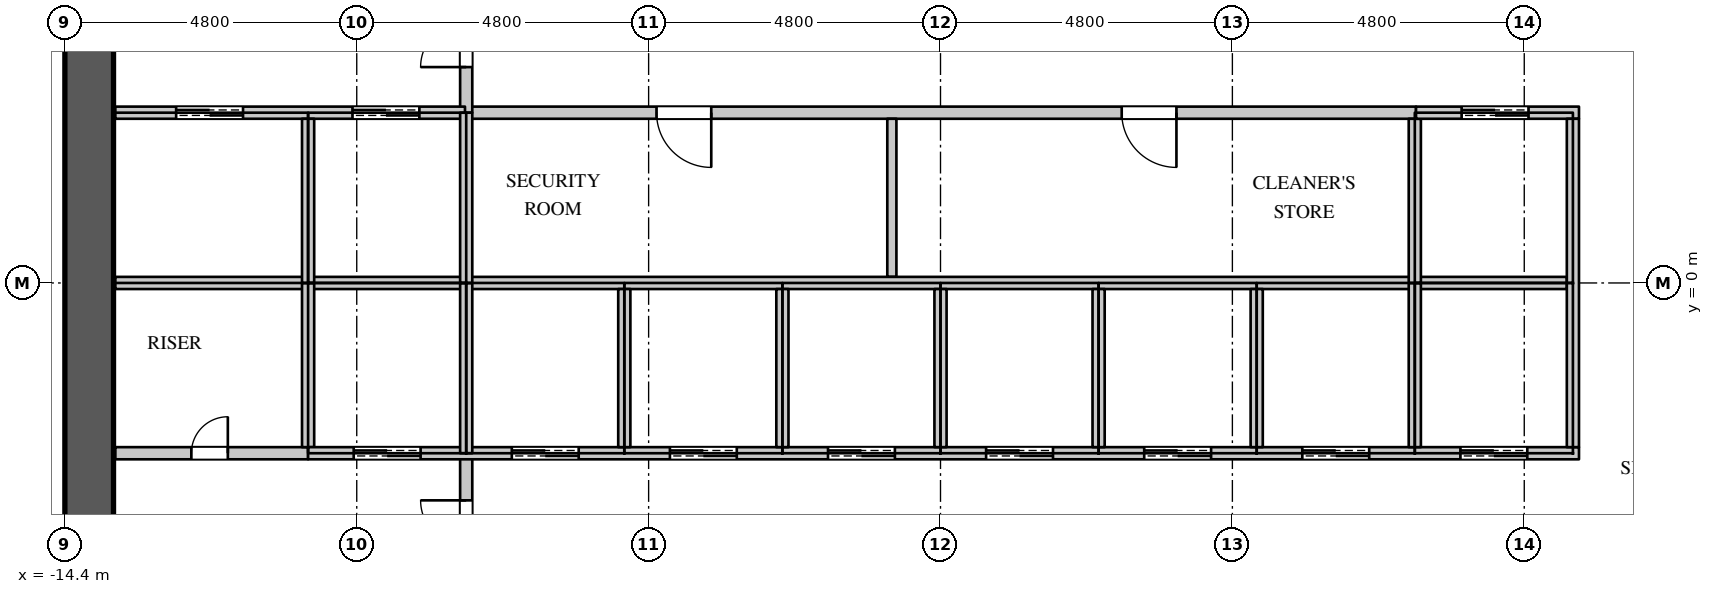
"""IFC4 building model, lengths in metres.
Left out: names, types, materials, properties, quantities, classifications, styles, units other than length and angle.
Written with IfcOpenShell. Run it as: python <this file> out.ifc"""

import sys

from ifc_helpers import new_model, si_unit, direction, frame, frame_2d, origin, place, context, subcontext, project, spatial, rectangle, extrude, element, fill, save


model = new_model("IFC4")
c1 = context("Model", 3, precision=1e-05, world=origin(), true_north=direction((0.0, 1.0)))
c2 = subcontext(c1, "Body", "Model", "MODEL_VIEW")
j1 = project(units=[si_unit("LENGTHUNIT", "METRE"), si_unit("PLANEANGLEUNIT", "RADIAN")], contexts=[c1])
p1 = place(None, origin())
s1 = spatial("IfcSite", under=j1, at=p1, CompositionType="ELEMENT")
p2 = place(p1, origin())
s2 = spatial("IfcBuilding", under=s1, at=p2, CompositionType="ELEMENT")
p3 = place(p2, frame((0.0, 0.0, 156.9)))
s3 = spatial("IfcBuildingStorey", under=s2, at=p3, CompositionType="ELEMENT", Elevation=156.9)
p4 = place(p3, frame((-14.0, -11.2, 0.0), z_axis=(0.0, 0.0, 1.0), x_axis=(0.0, 1.0, 0.0)))
e1 = element("IfcWall", 1, at=p4, inside=s3, PredefinedType="SHEAR", context=c2, shape_type="SweptSolid", body=[
    extrude(rectangle(XDim=22.4, YDim=0.8, at=frame_2d((11.2, 0.0))), origin(), (0.0, 0.0, 1.0), 5.4),
])
p5 = place(p4, frame((15.9, 0.0, 0.0)))
e2 = element("IfcOpeningElement", 2, at=p5, cuts=e1, PredefinedType="OPENING", context=c2, shape_type="SweptSolid", body=[
    extrude(rectangle(XDim=1.5, YDim=2.4, at=frame_2d((0.75, 1.2))), frame((0.0, 0.41, 0.0), z_axis=(0.0, -1.0, 0.0), x_axis=(1.0, 0.0, 0.0)), (0.0, 0.0, 1.0), 0.82),
])
p6 = place(p4, frame((4.9, 0.0, 0.0)))
e3 = element("IfcOpeningElement", 3, at=p6, cuts=e1, PredefinedType="OPENING", context=c2, shape_type="SweptSolid", body=[
    extrude(rectangle(XDim=1.5, YDim=2.4, at=frame_2d((0.75, 1.2))), frame((0.0, 0.41, 0.0), z_axis=(0.0, -1.0, 0.0), x_axis=(1.0, 0.0, 0.0)), (0.0, 0.0, 1.0), 0.82),
])
p7 = place(p3, frame((-7.82, 2.8, 0.0), z_axis=(0.0, 0.0, 1.0), x_axis=(1.0, 0.0, 0.0)))
e4 = element("IfcWall", 4, at=p7, inside=s3, PredefinedType="PARTITIONING", context=c2, shape_type="SweptSolid", body=[
    extrude(rectangle(XDim=15.64, YDim=0.2, at=frame_2d((7.82, 0.0))), origin(), (0.0, 0.0, 1.0), 5.1),
])
p8 = place(p7, frame((3.15, 0.0, 0.0)))
e5 = element("IfcOpeningElement", 5, at=p8, cuts=e4, PredefinedType="OPENING", context=c2, shape_type="SweptSolid", body=[
    extrude(rectangle(XDim=0.9, YDim=2.2, at=frame_2d((0.45, 1.1))), frame((0.0, 0.11, 0.0), z_axis=(0.0, -1.0, 0.0), x_axis=(1.0, 0.0, 0.0)), (0.0, 0.0, 1.0), 0.22),
])
p9 = place(p7, frame((10.8, 0.0, 0.0)))
e6 = element("IfcOpeningElement", 6, at=p9, cuts=e4, PredefinedType="OPENING", context=c2, shape_type="SweptSolid", body=[
    extrude(rectangle(XDim=0.9, YDim=2.2, at=frame_2d((0.45, 1.1))), frame((0.0, 0.11, 0.0), z_axis=(0.0, -1.0, 0.0), x_axis=(1.0, 0.0, 0.0)), (0.0, 0.0, 1.0), 0.22),
])
p10 = place(p3, frame((-7.8, -8.075, 0.0), z_axis=(0.0, 0.0, 1.0), x_axis=(0.0, 1.0, 0.0)))
e7 = element("IfcWall", 7, at=p10, inside=s3, PredefinedType="PARTITIONING", context=c2, shape_type="SweptSolid", body=[
    extrude(rectangle(XDim=5.275, YDim=0.2, at=frame_2d((2.637, 0.0))), origin(), (0.0, 0.0, 1.0), 5.1),
])
p11 = place(p10, frame((3.0, 0.0, 0.0)))
e8 = element("IfcOpeningElement", 8, at=p11, cuts=e7, PredefinedType="OPENING", context=c2, shape_type="SweptSolid", body=[
    extrude(rectangle(XDim=1.5, YDim=2.4, at=frame_2d((0.75, 1.2))), frame((0.0, 0.11, 0.0), z_axis=(0.0, -1.0, 0.0), x_axis=(1.0, 0.0, 0.0)), (0.0, 0.0, 1.0), 0.22),
])
p12 = place(p3, frame((-7.8, 2.8, 0.0), z_axis=(0.0, 0.0, 1.0), x_axis=(0.0, 1.0, 0.0)))
e9 = element("IfcWall", 9, at=p12, inside=s3, PredefinedType="PARTITIONING", context=c2, shape_type="SweptSolid", body=[
    extrude(rectangle(XDim=3.0, YDim=0.2, at=frame_2d((1.5, 0.0))), origin(), (0.0, 0.0, 1.0), 5.1),
])
p13 = place(p12, frame((0.75, 0.0, 0.0)))
e10 = element("IfcOpeningElement", 10, at=p13, cuts=e9, PredefinedType="OPENING", context=c2, shape_type="SweptSolid", body=[
    extrude(rectangle(XDim=1.5, YDim=2.4, at=frame_2d((0.75, 1.2))), frame((0.0, 0.11, 0.0), z_axis=(0.0, -1.0, 0.0), x_axis=(1.0, 0.0, 0.0)), (0.0, 0.0, 1.0), 0.22),
])
p14 = place(p3, frame((-0.8, 0.1, 0.0), z_axis=(0.0, 0.0, 1.0), x_axis=(0.0, 1.0, 0.0)))
e11 = element("IfcWall", 11, at=p14, inside=s3, PredefinedType="PARTITIONING", context=c2, shape_type="SweptSolid", body=[
    extrude(rectangle(XDim=2.6, YDim=0.15, at=frame_2d((1.3, 0.0))), origin(), (0.0, 0.0, 1.0), 5.1),
])
p15 = place(p3, frame((-13.57, -2.8, 0.0), z_axis=(0.0, 0.0, 1.0), x_axis=(1.0, 0.0, 0.0)))
e12 = element("IfcWall", 12, at=p15, inside=s3, PredefinedType="PARTITIONING", context=c2, shape_type="SweptSolid", body=[
    extrude(rectangle(XDim=3.17, YDim=0.2, at=frame_2d((1.585, 0.0))), origin(), (0.0, 0.0, 1.0), 5.1),
])
p16 = place(p15, frame((1.25, 0.0, 0.0)))
e13 = element("IfcOpeningElement", 13, at=p16, cuts=e12, PredefinedType="OPENING", context=c2, shape_type="SweptSolid", body=[
    extrude(rectangle(XDim=0.6, YDim=2.0, at=frame_2d((0.3, 1.0))), frame((0.0, 0.11, 0.0), z_axis=(0.0, -1.0, 0.0), x_axis=(1.0, 0.0, 0.0)), (0.0, 0.0, 1.0), 0.22),
])
p17 = place(p3, frame((-13.57, 0.0, 0.0), z_axis=(0.0, 0.0, 1.0), x_axis=(1.0, 0.0, 0.0)))
e14 = element("IfcWall", 14, at=p17, inside=s3, PredefinedType="PARTITIONING", context=c2, shape_type="SweptSolid", body=[
    extrude(rectangle(XDim=23.87, YDim=0.2, at=frame_2d((11.935, 0.0))), origin(), (0.0, 0.0, 1.0), 5.1),
])
p18 = place(p3, frame((-13.57, 2.8, 0.0), z_axis=(0.0, 0.0, 1.0), x_axis=(1.0, 0.0, 0.0)))
e15 = element("IfcWall", 15, at=p18, inside=s3, PredefinedType="PARTITIONING", context=c2, shape_type="SweptSolid", body=[
    extrude(rectangle(XDim=5.75, YDim=0.2, at=frame_2d((2.875, 0.0))), origin(), (0.0, 0.0, 1.0), 5.1),
])
p19 = place(p18, frame((1.0, 0.0, 0.0)))
e16 = element("IfcOpeningElement", 16, at=p19, cuts=e15, PredefinedType="OPENING", context=c2, shape_type="SweptSolid", body=[
    extrude(rectangle(XDim=1.1, YDim=2.2, at=frame_2d((0.55, 1.1))), frame((0.0, 0.11, 0.0), z_axis=(0.0, -1.0, 0.0), x_axis=(1.0, 0.0, 0.0)), (0.0, 0.0, 1.0), 0.22),
])
p20 = place(p18, frame((3.9, 0.0, 0.0)))
e17 = element("IfcOpeningElement", 17, at=p20, cuts=e15, PredefinedType="OPENING", context=c2, shape_type="SweptSolid", body=[
    extrude(rectangle(XDim=1.1, YDim=2.2, at=frame_2d((0.55, 1.1))), frame((0.0, 0.11, 0.0), z_axis=(0.0, -1.0, 0.0), x_axis=(1.0, 0.0, 0.0)), (0.0, 0.0, 1.0), 0.22),
])
p21 = place(p3, frame((-10.4, -2.7, 0.0), z_axis=(0.0, 0.0, 1.0), x_axis=(0.0, 1.0, 0.0)))
e18 = element("IfcWall", 18, at=p21, inside=s3, PredefinedType="PARTITIONING", context=c2, shape_type="SweptSolid", body=[
    extrude(rectangle(XDim=2.7, YDim=0.2, at=frame_2d((1.35, 0.0))), origin(), (0.0, 0.0, 1.0), 5.1),
])
p22 = place(p3, frame((-10.4, -2.8, 0.0), z_axis=(0.0, 0.0, 1.0), x_axis=(1.0, 0.0, 0.0)))
e19 = element("IfcWall", 19, at=p22, inside=s3, PredefinedType="PARTITIONING", context=c2, shape_type="SweptSolid", body=[
    extrude(rectangle(XDim=20.9, YDim=0.2, at=frame_2d((10.45, 0.0))), origin(), (0.0, 0.0, 1.0), 5.1),
])
p23 = place(p22, frame((0.75, 0.0, 0.0)))
e20 = element("IfcOpeningElement", 20, at=p23, cuts=e19, PredefinedType="OPENING", context=c2, shape_type="SweptSolid", body=[
    extrude(rectangle(XDim=1.1, YDim=2.2, at=frame_2d((0.55, 1.1))), frame((0.0, 0.11, 0.0), z_axis=(0.0, -1.0, 0.0), x_axis=(1.0, 0.0, 0.0)), (0.0, 0.0, 1.0), 0.22),
])
p24 = place(p22, frame((3.35, 0.0, 0.0)))
e21 = element("IfcOpeningElement", 21, at=p24, cuts=e19, PredefinedType="OPENING", context=c2, shape_type="SweptSolid", body=[
    extrude(rectangle(XDim=1.1, YDim=2.2, at=frame_2d((0.55, 1.1))), frame((0.0, 0.11, 0.0), z_axis=(0.0, -1.0, 0.0), x_axis=(1.0, 0.0, 0.0)), (0.0, 0.0, 1.0), 0.22),
])
p25 = place(p22, frame((5.95, 0.0, 0.0)))
e22 = element("IfcOpeningElement", 22, at=p25, cuts=e19, PredefinedType="OPENING", context=c2, shape_type="SweptSolid", body=[
    extrude(rectangle(XDim=1.1, YDim=2.2, at=frame_2d((0.55, 1.1))), frame((0.0, 0.11, 0.0), z_axis=(0.0, -1.0, 0.0), x_axis=(1.0, 0.0, 0.0)), (0.0, 0.0, 1.0), 0.22),
])
p26 = place(p22, frame((8.55, 0.0, 0.0)))
e23 = element("IfcOpeningElement", 23, at=p26, cuts=e19, PredefinedType="OPENING", context=c2, shape_type="SweptSolid", body=[
    extrude(rectangle(XDim=1.1, YDim=2.2, at=frame_2d((0.55, 1.1))), frame((0.0, 0.11, 0.0), z_axis=(0.0, -1.0, 0.0), x_axis=(1.0, 0.0, 0.0)), (0.0, 0.0, 1.0), 0.22),
])
p27 = place(p22, frame((11.15, 0.0, 0.0)))
e24 = element("IfcOpeningElement", 24, at=p27, cuts=e19, PredefinedType="OPENING", context=c2, shape_type="SweptSolid", body=[
    extrude(rectangle(XDim=1.1, YDim=2.2, at=frame_2d((0.55, 1.1))), frame((0.0, 0.11, 0.0), z_axis=(0.0, -1.0, 0.0), x_axis=(1.0, 0.0, 0.0)), (0.0, 0.0, 1.0), 0.22),
])
p28 = place(p22, frame((13.75, 0.0, 0.0)))
e25 = element("IfcOpeningElement", 25, at=p28, cuts=e19, PredefinedType="OPENING", context=c2, shape_type="SweptSolid", body=[
    extrude(rectangle(XDim=1.1, YDim=2.2, at=frame_2d((0.55, 1.1))), frame((0.0, 0.11, 0.0), z_axis=(0.0, -1.0, 0.0), x_axis=(1.0, 0.0, 0.0)), (0.0, 0.0, 1.0), 0.22),
])
p29 = place(p22, frame((16.35, 0.0, 0.0)))
e26 = element("IfcOpeningElement", 26, at=p29, cuts=e19, PredefinedType="OPENING", context=c2, shape_type="SweptSolid", body=[
    extrude(rectangle(XDim=1.1, YDim=2.2, at=frame_2d((0.55, 1.1))), frame((0.0, 0.11, 0.0), z_axis=(0.0, -1.0, 0.0), x_axis=(1.0, 0.0, 0.0)), (0.0, 0.0, 1.0), 0.22),
])
p30 = place(p22, frame((18.95, 0.0, 0.0)))
e27 = element("IfcOpeningElement", 27, at=p30, cuts=e19, PredefinedType="OPENING", context=c2, shape_type="SweptSolid", body=[
    extrude(rectangle(XDim=1.1, YDim=2.2, at=frame_2d((0.55, 1.1))), frame((0.0, 0.11, 0.0), z_axis=(0.0, -1.0, 0.0), x_axis=(1.0, 0.0, 0.0)), (0.0, 0.0, 1.0), 0.22),
])
p31 = place(p3, frame((-10.4, 0.0, 0.0), z_axis=(0.0, 0.0, 1.0), x_axis=(0.0, 1.0, 0.0)))
e28 = element("IfcWall", 28, at=p31, inside=s3, PredefinedType="PARTITIONING", context=c2, shape_type="SweptSolid", body=[
    extrude(rectangle(XDim=2.7, YDim=0.2, at=frame_2d((1.35, 0.0))), origin(), (0.0, 0.0, 1.0), 5.1),
])
for number, where, z_axis, x_axis in (
    (29, (-7.8, -2.8, 0.0), (0.0, 0.0, 1.0), (0.0, 1.0, 0.0)),
    (30, (-7.8, 0.0, 0.0), (0.0, 0.0, 1.0), (0.0, 1.0, 0.0)),
):
    element("IfcWall", number, at=place(p3, frame(where, z_axis=z_axis, x_axis=x_axis)), inside=s3, PredefinedType="PARTITIONING", context=c2, shape_type="SweptSolid", body=[
        extrude(rectangle(XDim=2.8, YDim=0.2, at=frame_2d((1.4, 0.0))), origin(), (0.0, 0.0, 1.0), 5.1),
    ])
for number, where, z_axis, x_axis in (
    (31, (-5.2, -2.7, 0.0), (0.0, 0.0, 1.0), (0.0, 1.0, 0.0)),
    (32, (-2.6, -2.7, 0.0), (0.0, 0.0, 1.0), (0.0, 1.0, 0.0)),
    (33, (0.0, -2.7, 0.0), (0.0, 0.0, 1.0), (0.0, 1.0, 0.0)),
    (34, (2.6, -2.7, 0.0), (0.0, 0.0, 1.0), (0.0, 1.0, 0.0)),
    (35, (5.2, -2.7, 0.0), (0.0, 0.0, 1.0), (0.0, 1.0, 0.0)),
):
    element("IfcWall", number, at=place(p3, frame(where, z_axis=z_axis, x_axis=x_axis)), inside=s3, PredefinedType="PARTITIONING", context=c2, shape_type="SweptSolid", body=[
        extrude(rectangle(XDim=2.6, YDim=0.2, at=frame_2d((1.3, 0.0))), origin(), (0.0, 0.0, 1.0), 5.1),
    ])
for number, where, z_axis, x_axis in (
    (36, (7.8, -2.7, 0.0), (0.0, 0.0, 1.0), (0.0, 1.0, 0.0)),
    (37, (7.8, 0.0, 0.0), (0.0, 0.0, 1.0), (0.0, 1.0, 0.0)),
):
    element("IfcWall", number, at=place(p3, frame(where, z_axis=z_axis, x_axis=x_axis)), inside=s3, PredefinedType="PARTITIONING", context=c2, shape_type="SweptSolid", body=[
        extrude(rectangle(XDim=2.7, YDim=0.2, at=frame_2d((1.35, 0.0))), origin(), (0.0, 0.0, 1.0), 5.1),
    ])
p32 = place(p3, frame((7.82, 2.8, 0.0), z_axis=(0.0, 0.0, 1.0), x_axis=(1.0, 0.0, 0.0)))
e38 = element("IfcWall", 38, at=p32, inside=s3, PredefinedType="PARTITIONING", context=c2, shape_type="SweptSolid", body=[
    extrude(rectangle(XDim=2.68, YDim=0.2, at=frame_2d((1.34, 0.0))), origin(), (0.0, 0.0, 1.0), 5.1),
])
p33 = place(p32, frame((0.75, 0.0, 0.0)))
e39 = element("IfcOpeningElement", 39, at=p33, cuts=e38, PredefinedType="OPENING", context=c2, shape_type="SweptSolid", body=[
    extrude(rectangle(XDim=1.1, YDim=2.2, at=frame_2d((0.55, 1.1))), frame((0.0, 0.11, 0.0), z_axis=(0.0, -1.0, 0.0), x_axis=(1.0, 0.0, 0.0)), (0.0, 0.0, 1.0), 0.22),
])
p34 = place(p3, frame((10.4, -2.7, 0.0), z_axis=(0.0, 0.0, 1.0), x_axis=(0.0, 1.0, 0.0)))
e40 = element("IfcWall", 40, at=p34, inside=s3, PredefinedType="PARTITIONING", context=c2, shape_type="SweptSolid", body=[
    extrude(rectangle(XDim=5.4, YDim=0.2, at=frame_2d((2.7, 0.0))), origin(), (0.0, 0.0, 1.0), 5.1),
])
p35 = place(p16, origin())
e41 = element("IfcDoor", 41, at=p35, inside=s3, OperationType="SINGLE_SWING_RIGHT", PredefinedType="DOOR", context=c2, shape_type="SweptSolid", body=[
    extrude(rectangle(XDim=0.6, YDim=2.0, at=frame_2d((0.3, 1.0))), frame((0.0, 0.025, 0.0), z_axis=(0.0, -1.0, 0.0), x_axis=(1.0, 0.0, 0.0)), (0.0, 0.0, 1.0), 0.05),
])
fill(e13, e41)
p36 = place(p8, origin())
e42 = element("IfcDoor", 42, at=p36, inside=s3, OperationType="SINGLE_SWING_LEFT", PredefinedType="DOOR", context=c2, shape_type="SweptSolid", body=[
    extrude(rectangle(XDim=0.9, YDim=2.2, at=frame_2d((0.45, 1.1))), frame((0.0, 0.025, 0.0), z_axis=(0.0, -1.0, 0.0), x_axis=(1.0, 0.0, 0.0)), (0.0, 0.0, 1.0), 0.05),
])
fill(e5, e42)
p37 = place(p9, origin())
e43 = element("IfcDoor", 43, at=p37, inside=s3, OperationType="SINGLE_SWING_LEFT", PredefinedType="DOOR", context=c2, shape_type="SweptSolid", body=[
    extrude(rectangle(XDim=0.9, YDim=2.2, at=frame_2d((0.45, 1.1))), frame((0.0, 0.025, 0.0), z_axis=(0.0, -1.0, 0.0), x_axis=(1.0, 0.0, 0.0)), (0.0, 0.0, 1.0), 0.05),
])
fill(e6, e43)
p38 = place(p19, origin())
e44 = element("IfcDoor", 44, at=p38, inside=s3, OperationType="DOUBLE_DOOR_SLIDING", PredefinedType="DOOR", context=c2, shape_type="SweptSolid", body=[
    extrude(rectangle(XDim=1.1, YDim=2.2, at=frame_2d((0.55, 1.1))), frame((0.0, 0.025, 0.0), z_axis=(0.0, -1.0, 0.0), x_axis=(1.0, 0.0, 0.0)), (0.0, 0.0, 1.0), 0.05),
])
fill(e16, e44)
p39 = place(p20, origin())
e45 = element("IfcDoor", 45, at=p39, inside=s3, OperationType="DOUBLE_DOOR_SLIDING", PredefinedType="DOOR", context=c2, shape_type="SweptSolid", body=[
    extrude(rectangle(XDim=1.1, YDim=2.2, at=frame_2d((0.55, 1.1))), frame((0.0, 0.025, 0.0), z_axis=(0.0, -1.0, 0.0), x_axis=(1.0, 0.0, 0.0)), (0.0, 0.0, 1.0), 0.05),
])
fill(e17, e45)
p40 = place(p23, origin())
e46 = element("IfcDoor", 46, at=p40, inside=s3, OperationType="DOUBLE_DOOR_SLIDING", PredefinedType="DOOR", context=c2, shape_type="SweptSolid", body=[
    extrude(rectangle(XDim=1.1, YDim=2.2, at=frame_2d((0.55, 1.1))), frame((0.0, 0.025, 0.0), z_axis=(0.0, -1.0, 0.0), x_axis=(1.0, 0.0, 0.0)), (0.0, 0.0, 1.0), 0.05),
])
fill(e20, e46)
p41 = place(p24, origin())
e47 = element("IfcDoor", 47, at=p41, inside=s3, OperationType="DOUBLE_DOOR_SLIDING", PredefinedType="DOOR", context=c2, shape_type="SweptSolid", body=[
    extrude(rectangle(XDim=1.1, YDim=2.2, at=frame_2d((0.55, 1.1))), frame((0.0, 0.025, 0.0), z_axis=(0.0, -1.0, 0.0), x_axis=(1.0, 0.0, 0.0)), (0.0, 0.0, 1.0), 0.05),
])
fill(e21, e47)
p42 = place(p25, origin())
e48 = element("IfcDoor", 48, at=p42, inside=s3, OperationType="DOUBLE_DOOR_SLIDING", PredefinedType="DOOR", context=c2, shape_type="SweptSolid", body=[
    extrude(rectangle(XDim=1.1, YDim=2.2, at=frame_2d((0.55, 1.1))), frame((0.0, 0.025, 0.0), z_axis=(0.0, -1.0, 0.0), x_axis=(1.0, 0.0, 0.0)), (0.0, 0.0, 1.0), 0.05),
])
fill(e22, e48)
p43 = place(p26, origin())
e49 = element("IfcDoor", 49, at=p43, inside=s3, OperationType="DOUBLE_DOOR_SLIDING", PredefinedType="DOOR", context=c2, shape_type="SweptSolid", body=[
    extrude(rectangle(XDim=1.1, YDim=2.2, at=frame_2d((0.55, 1.1))), frame((0.0, 0.025, 0.0), z_axis=(0.0, -1.0, 0.0), x_axis=(1.0, 0.0, 0.0)), (0.0, 0.0, 1.0), 0.05),
])
fill(e23, e49)
p44 = place(p27, origin())
e50 = element("IfcDoor", 50, at=p44, inside=s3, OperationType="DOUBLE_DOOR_SLIDING", PredefinedType="DOOR", context=c2, shape_type="SweptSolid", body=[
    extrude(rectangle(XDim=1.1, YDim=2.2, at=frame_2d((0.55, 1.1))), frame((0.0, 0.025, 0.0), z_axis=(0.0, -1.0, 0.0), x_axis=(1.0, 0.0, 0.0)), (0.0, 0.0, 1.0), 0.05),
])
fill(e24, e50)
p45 = place(p28, origin())
e51 = element("IfcDoor", 51, at=p45, inside=s3, OperationType="DOUBLE_DOOR_SLIDING", PredefinedType="DOOR", context=c2, shape_type="SweptSolid", body=[
    extrude(rectangle(XDim=1.1, YDim=2.2, at=frame_2d((0.55, 1.1))), frame((0.0, 0.025, 0.0), z_axis=(0.0, -1.0, 0.0), x_axis=(1.0, 0.0, 0.0)), (0.0, 0.0, 1.0), 0.05),
])
fill(e25, e51)
p46 = place(p29, origin())
e52 = element("IfcDoor", 52, at=p46, inside=s3, OperationType="DOUBLE_DOOR_SLIDING", PredefinedType="DOOR", context=c2, shape_type="SweptSolid", body=[
    extrude(rectangle(XDim=1.1, YDim=2.2, at=frame_2d((0.55, 1.1))), frame((0.0, 0.025, 0.0), z_axis=(0.0, -1.0, 0.0), x_axis=(1.0, 0.0, 0.0)), (0.0, 0.0, 1.0), 0.05),
])
fill(e26, e52)
p47 = place(p33, origin())
e53 = element("IfcDoor", 53, at=p47, inside=s3, OperationType="DOUBLE_DOOR_SLIDING", PredefinedType="DOOR", context=c2, shape_type="SweptSolid", body=[
    extrude(rectangle(XDim=1.1, YDim=2.2, at=frame_2d((0.55, 1.1))), frame((0.0, 0.025, 0.0), z_axis=(0.0, -1.0, 0.0), x_axis=(1.0, 0.0, 0.0)), (0.0, 0.0, 1.0), 0.05),
])
fill(e39, e53)
p48 = place(p30, origin())
e54 = element("IfcDoor", 54, at=p48, inside=s3, OperationType="DOUBLE_DOOR_SLIDING", PredefinedType="DOOR", context=c2, shape_type="SweptSolid", body=[
    extrude(rectangle(XDim=1.1, YDim=2.2, at=frame_2d((0.55, 1.1))), frame((0.0, 0.025, 0.0), z_axis=(0.0, -1.0, 0.0), x_axis=(1.0, 0.0, 0.0)), (0.0, 0.0, 1.0), 0.05),
])
fill(e27, e54)
p49 = place(p13, origin())
e55 = element("IfcDoor", 55, at=p49, inside=s3, OperationType="DOUBLE_DOOR_SINGLE_SWING", PredefinedType="DOOR", context=c2, shape_type="SweptSolid", body=[
    extrude(rectangle(XDim=1.5, YDim=2.4, at=frame_2d((0.75, 1.2))), frame((0.0, 0.025, 0.0), z_axis=(0.0, -1.0, 0.0), x_axis=(1.0, 0.0, 0.0)), (0.0, 0.0, 1.0), 0.05),
])
fill(e10, e55)
p50 = place(p11, origin())
e56 = element("IfcDoor", 56, at=p50, inside=s3, OperationType="DOUBLE_DOOR_SINGLE_SWING", PredefinedType="DOOR", context=c2, shape_type="SweptSolid", body=[
    extrude(rectangle(XDim=1.5, YDim=2.4, at=frame_2d((0.75, 1.2))), frame((0.0, 0.025, 0.0), z_axis=(0.0, -1.0, 0.0), x_axis=(1.0, 0.0, 0.0)), (0.0, 0.0, 1.0), 0.05),
])
fill(e8, e56)
save(model, sys.argv[1])
